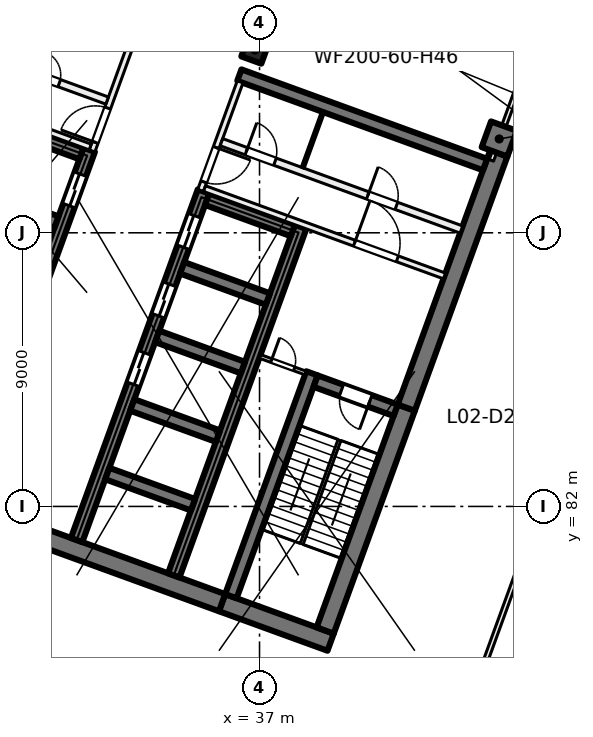
"""IFC4 building model, lengths in metres.
Left out: names, types, materials, properties, quantities, classifications, styles, units other than length and angle.
Written with IfcOpenShell. Run it as: python <this file> out.ifc"""

import sys

from ifc_helpers import new_model, si_unit, direction, frame, frame_2d, origin, origin_2d, place, context, subcontext, project, spatial, rectangle, extrude, element, fill, save


model = new_model("IFC4")
c1 = context("Model", 3, precision=1e-05, world=origin(), true_north=direction((0.0, 1.0)))
c2 = subcontext(c1, "Body", "Model", "MODEL_VIEW")
j1 = project(units=[si_unit("LENGTHUNIT", "METRE"), si_unit("PLANEANGLEUNIT", "RADIAN")], contexts=[c1])
p1 = place(None, origin())
s1 = spatial("IfcSite", under=j1, at=p1, CompositionType="ELEMENT")
p2 = place(p1, origin())
s2 = spatial("IfcBuilding", under=s1, at=p2, CompositionType="ELEMENT")
p3 = place(p2, frame((0.0, 0.0, 12.5)))
s3 = spatial("IfcBuildingStorey", under=s2, at=p3, CompositionType="ELEMENT", Elevation=12.5)
p4 = place(p3, frame((36.849, 97.011, 0.0), z_axis=(0.0, 0.0, 1.0), x_axis=(-0.342020143326, -0.939692620786, 0.0)))
e1 = element("IfcColumn", 1, at=p4, inside=s3, PredefinedType="COLUMN", context=c2, shape_type="SweptSolid", body=[
    extrude(rectangle(XDim=0.7, YDim=0.7, at=origin_2d()), origin(), (0.0, 0.0, 1.0), 5.0),
])
p5 = place(p3, frame((44.884, 94.087, 0.0), z_axis=(0.0, 0.0, 1.0), x_axis=(-0.342020143326, -0.939692620786, 0.0)))
e2 = element("IfcColumn", 2, at=p5, inside=s3, PredefinedType="COLUMN", context=c2, shape_type="SweptSolid", body=[
    extrude(rectangle(XDim=0.9, YDim=0.9, at=origin_2d()), origin(), (0.0, 0.0, 1.0), 5.0),
])
p6 = place(p3, frame((39.338, 77.535, 0.0), z_axis=(0.0, 0.0, 1.0), x_axis=(-0.939701471648, 0.341995824804, 0.0)))
e3 = element("IfcWall", 3, at=p6, inside=s3, PredefinedType="SHEAR", context=c2, shape_type="SweptSolid", body=[
    extrude(rectangle(XDim=3.8, YDim=0.6, at=frame_2d((1.9, 0.0))), origin(), (0.0, 0.0, 1.0), 5.0),
])
p7 = place(p3, frame((35.767, 78.835, 0.0), z_axis=(0.0, 0.0, 1.0), x_axis=(-0.939692894512, 0.342019391267, 0.0)))
e4 = element("IfcWall", 4, at=p7, inside=s3, PredefinedType="SHEAR", context=c2, shape_type="SweptSolid", body=[
    extrude(rectangle(XDim=14.4, YDim=0.6, at=frame_2d((7.2, 0.0))), origin(), (0.0, 0.0, 1.0), 5.0),
])
p8 = place(p3, frame((39.159, 77.92, 0.0), z_axis=(0.0, 0.0, 1.0), x_axis=(0.342016982193, 0.939693771338, 0.0)))
e5 = element("IfcWall", 5, at=p8, inside=s3, PredefinedType="SHEAR", context=c2, shape_type="SweptSolid", body=[
    extrude(rectangle(XDim=7.8, YDim=0.6, at=frame_2d((3.9, 0.0))), origin(), (0.0, 0.0, 1.0), 5.0),
])
p9 = place(p3, frame((41.827, 85.249, 0.0), z_axis=(0.0, 0.0, 1.0), x_axis=(0.342016162452, 0.939694069696, 0.0)))
e6 = element("IfcWall", 6, at=p9, inside=s3, PredefinedType="SHEAR", context=c2, shape_type="SweptSolid", body=[
    extrude(rectangle(XDim=8.9, YDim=0.6, at=frame_2d((4.45, 0.0))), origin(), (0.0, 0.0, 1.0), 5.0),
])
p10 = place(p3, frame((36.058, 79.048, 0.0), z_axis=(0.0, 0.0, 1.0), x_axis=(0.342016982193, 0.939693771338, 0.0)))
e7 = element("IfcWall", 7, at=p10, inside=s3, PredefinedType="SHEAR", context=c2, shape_type="SweptSolid", body=[
    extrude(rectangle(XDim=7.8, YDim=0.4, at=frame_2d((3.9, 0.0))), origin(), (0.0, 0.0, 1.0), 5.0),
])
p11 = place(p3, frame((41.476, 85.164, 0.0), z_axis=(0.0, 0.0, 1.0), x_axis=(-0.939678810556, 0.342058084236, 0.0)))
e8 = element("IfcWall", 8, at=p11, inside=s3, PredefinedType="SHEAR", context=c2, shape_type="SweptSolid", body=[
    extrude(rectangle(XDim=2.8, YDim=0.4, at=frame_2d((1.4, 0.0))), origin(), (0.0, 0.0, 1.0), 5.0),
])
p12 = place(p11, frame((0.9, 0.0, 0.0)))
e9 = element("IfcOpeningElement", 9, at=p12, cuts=e8, PredefinedType="OPENING", context=c2, shape_type="SweptSolid", body=[
    extrude(rectangle(XDim=1.0, YDim=2.1, at=frame_2d((0.5, 1.05))), frame((0.0, 0.21, 0.0), z_axis=(0.0, -1.0, 0.0), x_axis=(1.0, 0.0, 0.0)), (0.0, 0.0, 1.0), 0.42),
])
p13 = place(p3, frame((30.984, 80.895, 0.0), z_axis=(0.0, 0.0, 1.0), x_axis=(0.342021021735, 0.939692301071, 0.0)))
e10 = element("IfcWall", 10, at=p13, inside=s3, PredefinedType="SHEAR", context=c2, shape_type="SweptSolid", body=[
    extrude(rectangle(XDim=12.2, YDim=0.4, at=frame_2d((6.1, 0.0))), origin(), (0.0, 0.0, 1.0), 5.0),
])
p14 = place(p13, frame((5.45, 0.0, 0.0)))
e11 = element("IfcOpeningElement", 11, at=p14, cuts=e10, PredefinedType="OPENING", context=c2, shape_type="SweptSolid", body=[
    extrude(rectangle(XDim=1.1, YDim=2.1, at=frame_2d((0.55, 1.05))), frame((0.0, 0.21, 0.0), z_axis=(0.0, -1.0, 0.0), x_axis=(1.0, 0.0, 0.0)), (0.0, 0.0, 1.0), 0.42),
])
p15 = place(p13, frame((7.85, 0.0, 0.0)))
e12 = element("IfcOpeningElement", 12, at=p15, cuts=e10, PredefinedType="OPENING", context=c2, shape_type="SweptSolid", body=[
    extrude(rectangle(XDim=1.1, YDim=2.1, at=frame_2d((0.55, 1.05))), frame((0.0, 0.21, 0.0), z_axis=(0.0, -1.0, 0.0), x_axis=(1.0, 0.0, 0.0)), (0.0, 0.0, 1.0), 0.42),
])
p16 = place(p13, frame((10.25, 0.0, 0.0)))
e13 = element("IfcOpeningElement", 13, at=p16, cuts=e10, PredefinedType="OPENING", context=c2, shape_type="SweptSolid", body=[
    extrude(rectangle(XDim=1.1, YDim=2.1, at=frame_2d((0.55, 1.05))), frame((0.0, 0.21, 0.0), z_axis=(0.0, -1.0, 0.0), x_axis=(1.0, 0.0, 0.0)), (0.0, 0.0, 1.0), 0.42),
])
p17 = place(p3, frame((34.178, 79.732, 0.0), z_axis=(0.0, 0.0, 1.0), x_axis=(0.342014590177, 0.939694641948, 0.0)))
e14 = element("IfcWall", 14, at=p17, inside=s3, PredefinedType="SHEAR", context=c2, shape_type="SweptSolid", body=[
    extrude(rectangle(XDim=12.2, YDim=0.4, at=frame_2d((6.1, 0.0))), origin(), (0.0, 0.0, 1.0), 5.0),
])
for number, where, z_axis, x_axis in (
    (15, (34.812, 82.056, 0.0), (0.0, 0.0, 1.0), (-0.94, 0.342, 0.0)),
    (16, (35.632, 84.311, 0.0), (0.0, 0.0, 1.0), (-0.94, 0.342, 0.0)),
    (17, (36.453, 86.566, 0.0), (0.0, 0.0, 1.0), (-0.94, 0.342, 0.0)),
    (18, (37.274, 88.822, 0.0), (0.0, 0.0, 1.0), (-0.94, 0.342, 0.0)),
):
    element("IfcWall", number, at=place(p3, frame(where, z_axis=z_axis, x_axis=x_axis)), inside=s3, PredefinedType="SHEAR", context=c2, shape_type="SweptSolid", body=[
        extrude(rectangle(XDim=3.0, YDim=0.4, at=frame_2d((1.5, 0.0))), origin(), (0.0, 0.0, 1.0), 5.0),
    ])
p18 = place(p3, frame((38.095, 91.077, 0.0), z_axis=(0.0, 0.0, 1.0), x_axis=(-0.939676934218, 0.342063238742, 0.0)))
e19 = element("IfcWall", 19, at=p18, inside=s3, PredefinedType="SHEAR", context=c2, shape_type="SweptSolid", body=[
    extrude(rectangle(XDim=3.0, YDim=0.4, at=frame_2d((1.5, 0.0))), origin(), (0.0, 0.0, 1.0), 5.0),
])
p19 = place(p3, frame((27.225, 82.263, 0.0), z_axis=(0.0, 0.0, 1.0), x_axis=(0.342014590177, 0.939694641948, 0.0)))
e20 = element("IfcWall", 20, at=p19, inside=s3, PredefinedType="SHEAR", context=c2, shape_type="SweptSolid", body=[
    extrude(rectangle(XDim=12.2, YDim=0.4, at=frame_2d((6.1, 0.0))), origin(), (0.0, 0.0, 1.0), 5.0),
])
p20 = place(p19, frame((10.25, 0.0, 0.0)))
e21 = element("IfcOpeningElement", 21, at=p20, cuts=e20, PredefinedType="OPENING", context=c2, shape_type="SweptSolid", body=[
    extrude(rectangle(XDim=1.1, YDim=2.1, at=frame_2d((0.55, 1.05))), frame((0.0, 0.21, 0.0), z_axis=(0.0, -1.0, 0.0), x_axis=(1.0, 0.0, 0.0)), (0.0, 0.0, 1.0), 0.42),
])
p21 = place(p19, frame((0.7, 0.0, 0.0)))
e22 = element("IfcOpeningElement", 22, at=p21, cuts=e20, PredefinedType="OPENING", context=c2, shape_type="SweptSolid", body=[
    extrude(rectangle(XDim=0.8, YDim=2.1, at=frame_2d((0.4, 1.05))), frame((0.0, 0.21, 0.0), z_axis=(0.0, -1.0, 0.0), x_axis=(1.0, 0.0, 0.0)), (0.0, 0.0, 1.0), 0.42),
])
for number, where, z_axis, x_axis in (
    (23, (30.32, 91.353, 0.0), (0.0, 0.0, 1.0), (-0.94, 0.342, 0.0)),
    (24, (31.141, 93.608, 0.0), (0.0, 0.0, 1.0), (-0.94, 0.342, 0.0)),
):
    element("IfcWall", number, at=place(p3, frame(where, z_axis=z_axis, x_axis=x_axis)), inside=s3, PredefinedType="SHEAR", context=c2, shape_type="SweptSolid", body=[
        extrude(rectangle(XDim=3.0, YDim=0.4, at=frame_2d((1.5, 0.0))), origin(), (0.0, 0.0, 1.0), 5.0),
    ])
p22 = place(p3, frame((44.418, 93.245, 0.0), z_axis=(0.0, 0.0, 1.0), x_axis=(-0.93969060187, 0.342025690201, 0.0)))
e25 = element("IfcWall", 25, at=p22, inside=s3, PredefinedType="SHEAR", context=c2, shape_type="SweptSolid", body=[
    extrude(rectangle(XDim=8.6, YDim=0.4, at=frame_2d((4.3, 0.0))), origin(), (0.0, 0.0, 1.0), 5.0),
])
p23 = place(p3, frame((31.491, 93.693, 0.0), z_axis=(0.0, 0.0, 1.0), x_axis=(0.341995824804, 0.939701471648, 0.0)))
e26 = element("IfcWall", 26, at=p23, inside=s3, PredefinedType="PARTITIONING", context=c2, shape_type="SweptSolid", body=[
    extrude(rectangle(XDim=3.8, YDim=0.2, at=frame_2d((1.9, 0.0))), origin(), (0.0, 0.0, 1.0), 4.6),
])
p24 = place(p23, frame((0.3, 0.0, 0.0)))
e27 = element("IfcOpeningElement", 27, at=p24, cuts=e26, PredefinedType="OPENING", context=c2, shape_type="SweptSolid", body=[
    extrude(rectangle(XDim=1.2, YDim=2.1, at=frame_2d((0.6, 1.05))), frame((0.0, 0.11, 0.0), z_axis=(0.0, -1.0, 0.0), x_axis=(1.0, 0.0, 0.0)), (0.0, 0.0, 1.0), 0.22),
])
p25 = place(p3, frame((23.538, 96.694, 0.0), z_axis=(0.0, 0.0, 1.0), x_axis=(0.939691552312, -0.342023078919, 0.0)))
e28 = element("IfcWall", 28, at=p25, inside=s3, PredefinedType="PARTITIONING", context=c2, shape_type="SweptSolid", body=[
    extrude(rectangle(XDim=8.4, YDim=0.2, at=frame_2d((4.2, 0.0))), origin(), (0.0, 0.0, 1.0), 4.6),
])
p26 = place(p25, frame((1.65, 0.0, 0.0)))
e29 = element("IfcOpeningElement", 29, at=p26, cuts=e28, PredefinedType="OPENING", context=c2, shape_type="SweptSolid", body=[
    extrude(rectangle(XDim=1.5, YDim=2.1, at=frame_2d((0.75, 1.05))), frame((0.0, 0.11, 0.0), z_axis=(0.0, -1.0, 0.0), x_axis=(1.0, 0.0, 0.0)), (0.0, 0.0, 1.0), 0.22),
])
p27 = place(p3, frame((24.094, 98.221, 0.0), z_axis=(0.0, 0.0, 1.0), x_axis=(0.939691552312, -0.342023078919, 0.0)))
e30 = element("IfcWall", 30, at=p27, inside=s3, PredefinedType="PARTITIONING", context=c2, shape_type="SweptSolid", body=[
    extrude(rectangle(XDim=8.4, YDim=0.25, at=frame_2d((4.2, 0.0))), origin(), (0.0, 0.0, 1.0), 4.6),
])
p28 = place(p27, frame((5.925, 0.0, 0.0)))
e31 = element("IfcOpeningElement", 31, at=p28, cuts=e30, PredefinedType="OPENING", context=c2, shape_type="SweptSolid", body=[
    extrude(rectangle(XDim=0.8, YDim=2.1, at=frame_2d((0.4, 1.05))), frame((0.0, 0.135, 0.0), z_axis=(0.0, -1.0, 0.0), x_axis=(1.0, 0.0, 0.0)), (0.0, 0.0, 1.0), 0.27),
])
p29 = place(p27, frame((1.675, 0.0, 0.0)))
e32 = element("IfcOpeningElement", 32, at=p29, cuts=e30, PredefinedType="OPENING", context=c2, shape_type="SweptSolid", body=[
    extrude(rectangle(XDim=0.8, YDim=2.1, at=frame_2d((0.4, 1.05))), frame((0.0, 0.135, 0.0), z_axis=(0.0, -1.0, 0.0), x_axis=(1.0, 0.0, 0.0)), (0.0, 0.0, 1.0), 0.27),
])
p30 = place(p3, frame((36.362, 95.964, 0.0), z_axis=(0.0, 0.0, 1.0), x_axis=(-0.341995824804, -0.939701471648, 0.0)))
e33 = element("IfcWall", 33, at=p30, inside=s3, PredefinedType="PARTITIONING", context=c2, shape_type="SweptSolid", body=[
    extrude(rectangle(XDim=3.8, YDim=0.2, at=frame_2d((1.9, 0.0))), origin(), (0.0, 0.0, 1.0), 4.6),
])
p31 = place(p30, frame((2.3, 0.0, 0.0)))
e34 = element("IfcOpeningElement", 34, at=p31, cuts=e33, PredefinedType="OPENING", context=c2, shape_type="SweptSolid", body=[
    extrude(rectangle(XDim=1.2, YDim=2.1, at=frame_2d((0.6, 1.05))), frame((0.0, 0.11, 0.0), z_axis=(0.0, -1.0, 0.0), x_axis=(1.0, 0.0, 0.0)), (0.0, 0.0, 1.0), 0.22),
])
p32 = place(p3, frame((35.19, 92.453, 0.0), z_axis=(0.0, 0.0, 1.0), x_axis=(0.939691552312, -0.342023078919, 0.0)))
e35 = element("IfcWall", 35, at=p32, inside=s3, PredefinedType="PARTITIONING", context=c2, shape_type="SweptSolid", body=[
    extrude(rectangle(XDim=8.4, YDim=0.2, at=frame_2d((4.2, 0.0))), origin(), (0.0, 0.0, 1.0), 4.6),
])
p33 = place(p32, frame((5.25, 0.0, 0.0)))
e36 = element("IfcOpeningElement", 36, at=p33, cuts=e35, PredefinedType="OPENING", context=c2, shape_type="SweptSolid", body=[
    extrude(rectangle(XDim=1.5, YDim=2.1, at=frame_2d((0.75, 1.05))), frame((0.0, 0.11, 0.0), z_axis=(0.0, -1.0, 0.0), x_axis=(1.0, 0.0, 0.0)), (0.0, 0.0, 1.0), 0.22),
])
p34 = place(p3, frame((35.746, 93.98, 0.0), z_axis=(0.0, 0.0, 1.0), x_axis=(0.939691552312, -0.342023078919, 0.0)))
e37 = element("IfcWall", 37, at=p34, inside=s3, PredefinedType="PARTITIONING", context=c2, shape_type="SweptSolid", body=[
    extrude(rectangle(XDim=8.4, YDim=0.25, at=frame_2d((4.2, 0.0))), origin(), (0.0, 0.0, 1.0), 4.6),
])
p35 = place(p34, frame((0.875, 0.0, 0.0)))
e38 = element("IfcOpeningElement", 38, at=p35, cuts=e37, PredefinedType="OPENING", context=c2, shape_type="SweptSolid", body=[
    extrude(rectangle(XDim=1.0, YDim=2.1, at=frame_2d((0.5, 1.05))), frame((0.0, 0.135, 0.0), z_axis=(0.0, -1.0, 0.0), x_axis=(1.0, 0.0, 0.0)), (0.0, 0.0, 1.0), 0.27),
])
p36 = place(p34, frame((5.125, 0.0, 0.0)))
e39 = element("IfcOpeningElement", 39, at=p36, cuts=e37, PredefinedType="OPENING", context=c2, shape_type="SweptSolid", body=[
    extrude(rectangle(XDim=1.0, YDim=2.1, at=frame_2d((0.5, 1.05))), frame((0.0, 0.135, 0.0), z_axis=(0.0, -1.0, 0.0), x_axis=(1.0, 0.0, 0.0)), (0.0, 0.0, 1.0), 0.27),
])
p37 = place(p3, frame((37.013, 86.935, 0.0), z_axis=(0.0, 0.0, 1.0), x_axis=(0.939659694648, -0.342110593602, 0.0)))
e40 = element("IfcWall", 40, at=p37, inside=s3, PredefinedType="PARTITIONING", context=c2, shape_type="SweptSolid", body=[
    extrude(rectangle(XDim=1.6, YDim=0.125, at=frame_2d((0.8, 0.0))), origin(), (0.0, 0.0, 1.0), 4.6),
])
p38 = place(p37, frame((0.4, 0.0, 0.0)))
e41 = element("IfcOpeningElement", 41, at=p38, cuts=e40, PredefinedType="OPENING", context=c2, shape_type="SweptSolid", body=[
    extrude(rectangle(XDim=0.8, YDim=2.1, at=frame_2d((0.4, 1.05))), frame((0.0, 0.073, 0.0), z_axis=(0.0, -1.0, 0.0), x_axis=(1.0, 0.0, 0.0)), (0.0, 0.0, 1.0), 0.145),
])
p39 = place(p3, frame((39.087, 94.973, 0.0), z_axis=(0.0, 0.0, 1.0), x_axis=(-0.342024501273, -0.939691034611, 0.0)))
e42 = element("IfcWall", 42, at=p39, inside=s3, PredefinedType="PARTITIONING", context=c2, shape_type="SweptSolid", body=[
    extrude(rectangle(XDim=1.95, YDim=0.1, at=frame_2d((0.975, 0.0))), origin(), (0.0, 0.0, 1.0), 4.6),
])
p40 = place(p3, frame((36.0, 73.11, 0.0), z_axis=(0.0, 0.0, 1.0), x_axis=(-0.939696975073, 0.342008179784, 0.0)))
e43 = element("IfcWall", 43, at=p40, inside=s3, PredefinedType="PARTITIONING", context=c2, shape_type="SweptSolid", body=[
    extrude(rectangle(XDim=19.075, YDim=0.15, at=frame_2d((9.538, 0.0))), origin(), (0.0, 0.0, 1.0), 4.6),
])
p41 = place(p40, frame((9.076, 0.0, 0.0)))
e44 = element("IfcOpeningElement", 44, at=p41, cuts=e43, PredefinedType="OPENING", context=c2, shape_type="SweptSolid", body=[
    extrude(rectangle(XDim=1.0, YDim=2.1, at=frame_2d((0.5, 1.05))), frame((0.0, 0.085, 0.0), z_axis=(0.0, -1.0, 0.0), x_axis=(1.0, 0.0, 0.0)), (0.0, 0.0, 1.0), 0.17),
])
p42 = place(p3, frame((49.196, 90.0, 0.0), z_axis=(0.0, 0.0, 1.0), x_axis=(-0.342037332118, -0.939686364399, 0.0)))
e45 = element("IfcWall", 45, at=p42, inside=s3, PredefinedType="PARTITIONING", context=c2, shape_type="SweptSolid", body=[
    extrude(rectangle(XDim=15.387, YDim=0.15, at=frame_2d((7.693, 0.0))), origin(), (0.0, 0.0, 1.0), 4.6),
])
p43 = place(p42, frame((6.99, 0.0, 0.0)))
e46 = element("IfcOpeningElement", 46, at=p43, cuts=e45, PredefinedType="OPENING", context=c2, shape_type="SweptSolid", body=[
    extrude(rectangle(XDim=1.0, YDim=2.1, at=frame_2d((0.5, 1.05))), frame((0.0, 0.085, 0.0), z_axis=(0.0, -1.0, 0.0), x_axis=(1.0, 0.0, 0.0)), (0.0, 0.0, 1.0), 0.17),
])
p44 = place(p3, frame((44.627, 93.382, 0.0), z_axis=(0.0, 0.0, 1.0), x_axis=(0.342025351501, 0.939690725149, 0.0)))
e47 = element("IfcWall", 47, at=p44, inside=s3, PredefinedType="PARTITIONING", context=c2, shape_type="SweptSolid", body=[
    extrude(rectangle(XDim=5.0, YDim=0.15, at=frame_2d((2.5, 0.0))), origin(), (0.0, 0.0, 1.0), 4.6),
])
p45 = place(p20, origin())
e48 = element("IfcDoor", 48, at=p45, inside=s3, OperationType="DOUBLE_DOOR_SLIDING", PredefinedType="DOOR", context=c2, shape_type="SweptSolid", body=[
    extrude(rectangle(XDim=1.1, YDim=2.1, at=frame_2d((0.55, 1.05))), frame((0.0, 0.025, 0.0), z_axis=(0.0, -1.0, 0.0), x_axis=(1.0, 0.0, 0.0)), (0.0, 0.0, 1.0), 0.05),
])
fill(e21, e48)
p46 = place(p14, origin())
e49 = element("IfcDoor", 49, at=p46, inside=s3, OperationType="DOUBLE_DOOR_SLIDING", PredefinedType="DOOR", context=c2, shape_type="SweptSolid", body=[
    extrude(rectangle(XDim=1.1, YDim=2.1, at=frame_2d((0.55, 1.05))), frame((0.0, 0.025, 0.0), z_axis=(0.0, -1.0, 0.0), x_axis=(1.0, 0.0, 0.0)), (0.0, 0.0, 1.0), 0.05),
])
fill(e11, e49)
p47 = place(p15, origin())
e50 = element("IfcDoor", 50, at=p47, inside=s3, OperationType="DOUBLE_DOOR_SLIDING", PredefinedType="DOOR", context=c2, shape_type="SweptSolid", body=[
    extrude(rectangle(XDim=1.1, YDim=2.1, at=frame_2d((0.55, 1.05))), frame((0.0, 0.025, 0.0), z_axis=(0.0, -1.0, 0.0), x_axis=(1.0, 0.0, 0.0)), (0.0, 0.0, 1.0), 0.05),
])
fill(e12, e50)
p48 = place(p16, origin())
e51 = element("IfcDoor", 51, at=p48, inside=s3, OperationType="DOUBLE_DOOR_SLIDING", PredefinedType="DOOR", context=c2, shape_type="SweptSolid", body=[
    extrude(rectangle(XDim=1.1, YDim=2.1, at=frame_2d((0.55, 1.05))), frame((0.0, 0.025, 0.0), z_axis=(0.0, -1.0, 0.0), x_axis=(1.0, 0.0, 0.0)), (0.0, 0.0, 1.0), 0.05),
])
fill(e13, e51)
p49 = place(p24, origin())
e52 = element("IfcDoor", 52, at=p49, inside=s3, OperationType="DOUBLE_DOOR_SINGLE_SWING", PredefinedType="DOOR", context=c2, shape_type="SweptSolid", body=[
    extrude(rectangle(XDim=1.2, YDim=2.1, at=frame_2d((0.6, 1.05))), frame((0.0, 0.025, 0.0), z_axis=(0.0, -1.0, 0.0), x_axis=(1.0, 0.0, 0.0)), (0.0, 0.0, 1.0), 0.05),
])
fill(e27, e52)
p50 = place(p28, origin())
e53 = element("IfcDoor", 53, at=p50, inside=s3, OperationType="SINGLE_SWING_LEFT", PredefinedType="DOOR", context=c2, shape_type="SweptSolid", body=[
    extrude(rectangle(XDim=0.8, YDim=2.1, at=frame_2d((0.4, 1.05))), frame((0.0, 0.025, 0.0), z_axis=(0.0, -1.0, 0.0), x_axis=(1.0, 0.0, 0.0)), (0.0, 0.0, 1.0), 0.05),
])
fill(e31, e53)
p51 = place(p31, origin())
e54 = element("IfcDoor", 54, at=p51, inside=s3, OperationType="DOUBLE_DOOR_SINGLE_SWING", PredefinedType="DOOR", context=c2, shape_type="SweptSolid", body=[
    extrude(rectangle(XDim=1.2, YDim=2.1, at=frame_2d((0.6, 1.05))), frame((0.0, 0.025, 0.0), z_axis=(0.0, -1.0, 0.0), x_axis=(1.0, 0.0, 0.0)), (0.0, 0.0, 1.0), 0.05),
])
fill(e34, e54)
p52 = place(p33, origin())
e55 = element("IfcDoor", 55, at=p52, inside=s3, OperationType="DOUBLE_DOOR_SINGLE_SWING", PredefinedType="DOOR", context=c2, shape_type="SweptSolid", body=[
    extrude(rectangle(XDim=1.5, YDim=2.1, at=frame_2d((0.75, 1.05))), frame((0.0, 0.025, 0.0), z_axis=(0.0, -1.0, 0.0), x_axis=(1.0, 0.0, 0.0)), (0.0, 0.0, 1.0), 0.05),
])
fill(e36, e55)
p53 = place(p12, origin())
e56 = element("IfcDoor", 56, at=p53, inside=s3, OperationType="SINGLE_SWING_RIGHT", PredefinedType="DOOR", context=c2, shape_type="SweptSolid", body=[
    extrude(rectangle(XDim=1.0, YDim=2.1, at=frame_2d((0.5, 1.05))), frame((0.0, 0.025, 0.0), z_axis=(0.0, -1.0, 0.0), x_axis=(1.0, 0.0, 0.0)), (0.0, 0.0, 1.0), 0.05),
])
fill(e9, e56)
p54 = place(p38, origin())
e57 = element("IfcDoor", 57, at=p54, inside=s3, OperationType="SINGLE_SWING_LEFT", PredefinedType="DOOR", context=c2, shape_type="SweptSolid", body=[
    extrude(rectangle(XDim=0.8, YDim=2.1, at=frame_2d((0.4, 1.05))), frame((0.0, 0.025, 0.0), z_axis=(0.0, -1.0, 0.0), x_axis=(1.0, 0.0, 0.0)), (0.0, 0.0, 1.0), 0.05),
])
fill(e41, e57)
p55 = place(p35, origin())
e58 = element("IfcDoor", 58, at=p55, inside=s3, OperationType="SINGLE_SWING_RIGHT", PredefinedType="DOOR", context=c2, shape_type="SweptSolid", body=[
    extrude(rectangle(XDim=1.0, YDim=2.1, at=frame_2d((0.5, 1.05))), frame((0.0, 0.025, 0.0), z_axis=(0.0, -1.0, 0.0), x_axis=(1.0, 0.0, 0.0)), (0.0, 0.0, 1.0), 0.05),
])
fill(e38, e58)
p56 = place(p36, origin())
e59 = element("IfcDoor", 59, at=p56, inside=s3, OperationType="SINGLE_SWING_LEFT", PredefinedType="DOOR", context=c2, shape_type="SweptSolid", body=[
    extrude(rectangle(XDim=1.0, YDim=2.1, at=frame_2d((0.5, 1.05))), frame((0.0, 0.025, 0.0), z_axis=(0.0, -1.0, 0.0), x_axis=(1.0, 0.0, 0.0)), (0.0, 0.0, 1.0), 0.05),
])
fill(e39, e59)
save(model, sys.argv[1])
